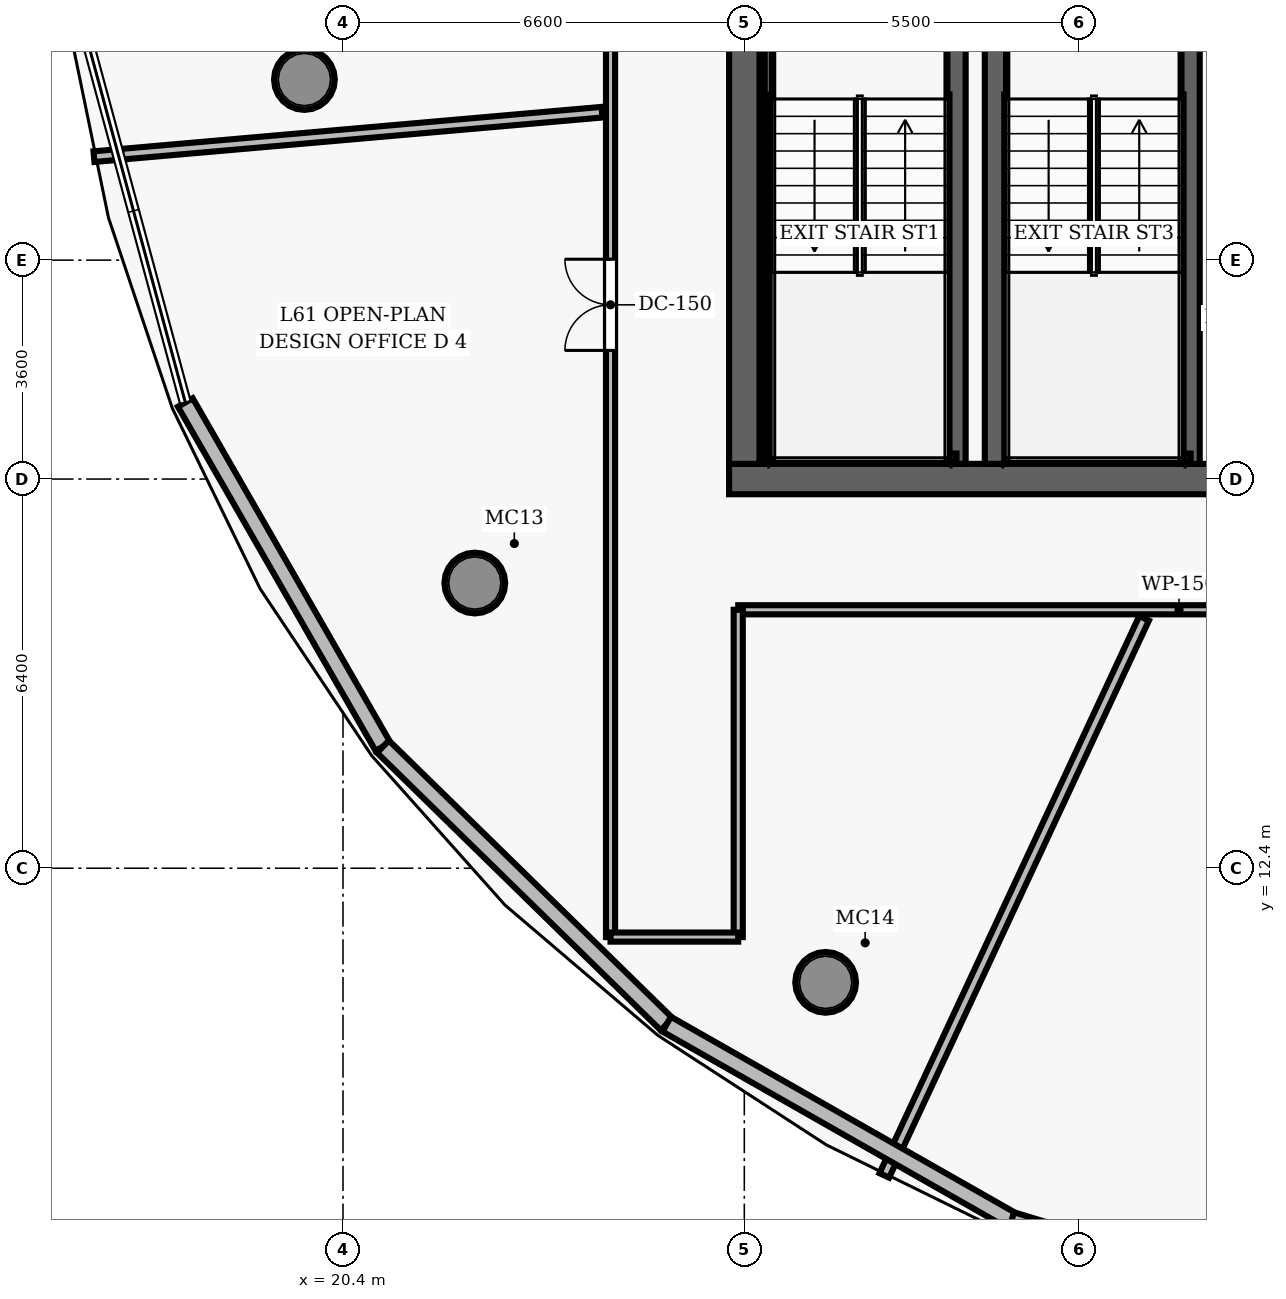
"""IFC4 building model, lengths in metres.
Left out: names, types, materials, properties, quantities, classifications, styles, units other than length and angle.
Written with IfcOpenShell. Run it as: python <this file> out.ifc"""

import sys

from ifc_helpers import new_model, si_unit, direction, frame, frame_2d, origin, origin_2d, place, context, subcontext, project, spatial, rectangle, hollow_circle, extrude, element, fill, save


model = new_model("IFC4")
c1 = context("Model", 3, precision=1e-05, world=origin(), true_north=direction((0.0, 1.0)))
c2 = subcontext(c1, "Body", "Model", "MODEL_VIEW")
j1 = project(units=[si_unit("LENGTHUNIT", "METRE"), si_unit("PLANEANGLEUNIT", "RADIAN")], contexts=[c1])
p1 = place(None, origin())
s1 = spatial("IfcSite", under=j1, at=p1, CompositionType="ELEMENT")
p2 = place(p1, origin())
s2 = spatial("IfcBuilding", under=s1, at=p2, CompositionType="ELEMENT")
p3 = place(p2, frame((0.0, 0.0, 242.05)))
s3 = spatial("IfcBuildingStorey", under=s2, at=p3, CompositionType="ELEMENT", Elevation=242.05)
p4 = place(p3, frame((26.75, 18.8, 0.0), z_axis=(0.0, 0.0, 1.0), x_axis=(1.0, 0.0, 0.0)))
e1 = element("IfcWall", 1, at=p4, inside=s3, PredefinedType="SHEAR", context=c2, shape_type="SweptSolid", body=[
    extrude(rectangle(XDim=22.5, YDim=0.5, at=frame_2d((11.25, 0.0))), origin(), (0.0, 0.0, 1.0), 3.85),
])
p5 = place(p4, frame((14.47, 0.0, 0.0)))
e2 = element("IfcOpeningElement", 2, at=p5, cuts=e1, PredefinedType="OPENING", context=c2, shape_type="SweptSolid", body=[
    extrude(rectangle(XDim=1.05, YDim=2.15, at=frame_2d((0.525, 1.075))), frame((0.0, 0.26, 0.0), z_axis=(0.0, -1.0, 0.0), x_axis=(1.0, 0.0, 0.0)), (0.0, 0.0, 1.0), 0.52),
])
p6 = place(p3, frame((27.0, 19.05, 0.0), z_axis=(0.0, 0.0, 1.0), x_axis=(0.0, 1.0, 0.0)))
e3 = element("IfcWall", 3, at=p6, inside=s3, PredefinedType="SHEAR", context=c2, shape_type="SweptSolid", body=[
    extrude(rectangle(XDim=13.9, YDim=0.5, at=frame_2d((6.95, 0.0))), origin(), (0.0, 0.0, 1.0), 3.85),
])
p7 = place(p6, frame((8.2, 0.0, 0.0)))
e4 = element("IfcOpeningElement", 4, at=p7, cuts=e3, PredefinedType="OPENING", context=c2, shape_type="SweptSolid", body=[
    extrude(rectangle(XDim=1.05, YDim=2.15, at=frame_2d((0.525, 1.075))), frame((0.0, 0.26, 0.0), z_axis=(0.0, -1.0, 0.0), x_axis=(1.0, 0.0, 0.0)), (0.0, 0.0, 1.0), 0.52),
])
p8 = place(p3, frame((31.13, 19.05, 0.0), z_axis=(0.0, 0.0, 1.0), x_axis=(0.0, 1.0, 0.0)))
e5 = element("IfcWall", 5, at=p8, inside=s3, PredefinedType="SHEAR", context=c2, shape_type="SweptSolid", body=[
    extrude(rectangle(XDim=13.9, YDim=0.35, at=frame_2d((6.95, 0.0))), origin(), (0.0, 0.0, 1.0), 3.85),
])
for number, where, z_axis, x_axis in (
    (6, (19.765, 25.371, 0.0), (0.0, 0.0, 1.0), (1.0, 0.0, 0.0)),
    (7, (22.567, 17.09, 0.0), (0.0, 0.0, 1.0), (1.0, 0.0, 0.0)),
    (8, (28.338, 10.523, 0.0), (0.0, 0.0, 1.0), (1.0, 0.0, 0.0)),
):
    element("IfcColumn", number, at=place(p3, frame(where, z_axis=z_axis, x_axis=x_axis)), inside=s3, PredefinedType="COLUMN", context=c2, shape_type="SweptSolid", body=[
        extrude(hollow_circle(Radius=0.5, WallThickness=0.045, at=origin_2d()), origin(), (0.0, 0.0, 1.0), 3.85),
    ])
p9 = place(p3, frame((30.49, 19.05, 0.0), z_axis=(0.0, 0.0, 1.0), x_axis=(0.0, 1.0, 0.0)))
e9 = element("IfcWall", 9, at=p9, inside=s3, PredefinedType="SHEAR", context=c2, shape_type="SweptSolid", body=[
    extrude(rectangle(XDim=7.5, YDim=0.3, at=frame_2d((3.75, 0.0))), origin(), (0.0, 0.0, 1.0), 3.85),
])
p10 = place(p3, frame((27.395, 19.1, 0.0), z_axis=(0.0, 0.0, 1.0), x_axis=(0.0, 1.0, 0.0)))
e10 = element("IfcWall", 10, at=p10, inside=s3, PredefinedType="SHEAR", context=c2, shape_type="SweptSolid", body=[
    extrude(rectangle(XDim=7.45, YDim=0.12, at=frame_2d((3.725, 0.0))), origin(), (0.0, 0.0, 1.0), 3.85),
])
p11 = place(p3, frame((27.395, 19.16, 0.0), z_axis=(0.0, 0.0, 1.0), x_axis=(1.0, 0.0, 0.0)))
e11 = element("IfcWall", 11, at=p11, inside=s3, PredefinedType="SHEAR", context=c2, shape_type="SweptSolid", body=[
    extrude(rectangle(XDim=3.095, YDim=0.12, at=frame_2d((1.547, 0.0))), origin(), (0.0, 0.0, 1.0), 3.85),
])
p12 = place(p3, frame((34.34, 19.05, 0.0), z_axis=(0.0, 0.0, 1.0), x_axis=(0.0, 1.0, 0.0)))
e12 = element("IfcWall", 12, at=p12, inside=s3, PredefinedType="SHEAR", context=c2, shape_type="SweptSolid", body=[
    extrude(rectangle(XDim=7.5, YDim=0.3, at=frame_2d((3.75, 0.0))), origin(), (0.0, 0.0, 1.0), 3.85),
])
p13 = place(p3, frame((31.3, 19.16, 0.0), z_axis=(0.0, 0.0, 1.0), x_axis=(1.0, 0.0, 0.0)))
e13 = element("IfcWall", 13, at=p13, inside=s3, PredefinedType="SHEAR", context=c2, shape_type="SweptSolid", body=[
    extrude(rectangle(XDim=3.04, YDim=0.12, at=frame_2d((1.52, 0.0))), origin(), (0.0, 0.0, 1.0), 3.85),
])
p14 = place(p3, frame((26.9, 16.65, 0.0), z_axis=(0.0, 0.0, 1.0), x_axis=(1.0, 0.0, 0.0)))
e14 = element("IfcWall", 14, at=p14, inside=s3, PredefinedType="PARTITIONING", context=c2, shape_type="SweptSolid", body=[
    extrude(rectangle(XDim=22.2, YDim=0.15, at=frame_2d((11.1, 0.0))), origin(), (0.0, 0.0, 1.0), 3.04),
])
p15 = place(p14, frame((14.65, 0.0, 0.0)))
e15 = element("IfcOpeningElement", 15, at=p15, cuts=e14, PredefinedType="OPENING", context=c2, shape_type="SweptSolid", body=[
    extrude(rectangle(XDim=0.95, YDim=2.15, at=frame_2d((0.475, 1.075))), frame((0.0, 0.085, 0.0), z_axis=(0.0, -1.0, 0.0), x_axis=(1.0, 0.0, 0.0)), (0.0, 0.0, 1.0), 0.17),
])
p16 = place(p3, frame((24.8, 11.268, 0.0), z_axis=(0.0, 0.0, 1.0), x_axis=(0.0, 1.0, 0.0)))
e16 = element("IfcWall", 16, at=p16, inside=s3, PredefinedType="PARTITIONING", context=c2, shape_type="SweptSolid", body=[
    extrude(rectangle(XDim=30.132, YDim=0.15, at=frame_2d((15.066, 0.0))), origin(), (0.0, 0.0, 1.0), 3.04),
])
p17 = place(p16, frame((16.736, 0.0, 0.0)))
e17 = element("IfcOpeningElement", 17, at=p17, cuts=e16, PredefinedType="OPENING", context=c2, shape_type="SweptSolid", body=[
    extrude(rectangle(XDim=1.5, YDim=2.2, at=frame_2d((0.75, 1.1))), frame((0.0, 0.085, 0.0), z_axis=(0.0, -1.0, 0.0), x_axis=(1.0, 0.0, 0.0)), (0.0, 0.0, 1.0), 0.17),
])
p18 = place(p16, frame((9.648, 0.0, 0.0)))
e18 = element("IfcOpeningElement", 18, at=p18, cuts=e16, PredefinedType="OPENING", context=c2, shape_type="SweptSolid", body=[
    extrude(rectangle(XDim=1.5, YDim=2.2, at=frame_2d((0.75, 1.1))), frame((0.0, 0.085, 0.0), z_axis=(0.0, -1.0, 0.0), x_axis=(1.0, 0.0, 0.0)), (0.0, 0.0, 1.0), 0.17),
])
p19 = place(p3, frame((26.9, 11.268, 0.0), z_axis=(0.0, 0.0, 1.0), x_axis=(0.0, 1.0, 0.0)))
e19 = element("IfcWall", 19, at=p19, inside=s3, PredefinedType="PARTITIONING", context=c2, shape_type="SweptSolid", body=[
    extrude(rectangle(XDim=5.382, YDim=0.15, at=frame_2d((2.691, 0.0))), origin(), (0.0, 0.0, 1.0), 3.04),
])
p20 = place(p3, frame((24.8, 11.268, 0.0), z_axis=(0.0, 0.0, 1.0), x_axis=(1.0, 0.0, 0.0)))
e20 = element("IfcWall", 20, at=p20, inside=s3, PredefinedType="PARTITIONING", context=c2, shape_type="SweptSolid", body=[
    extrude(rectangle(XDim=2.1, YDim=0.15, at=frame_2d((1.05, 0.0))), origin(), (0.0, 0.0, 1.0), 3.04),
])
p21 = place(p3, frame((24.66, 24.833, 0.0), z_axis=(0.0, 0.0, 1.0), x_axis=(-0.996192927603, -0.087175977156, 0.0)))
e21 = element("IfcWall", 21, at=p21, inside=s3, PredefinedType="PARTITIONING", context=c2, shape_type="SweptSolid", body=[
    extrude(rectangle(XDim=8.388, YDim=0.175, at=frame_2d((4.194, 0.0))), origin(), (0.0, 0.0, 1.0), 3.04),
])
p22 = place(p3, frame((33.575, 16.51, 0.0), z_axis=(0.0, 0.0, 1.0), x_axis=(-0.422617069522, -0.906308342976, 0.0)))
e22 = element("IfcWall", 22, at=p22, inside=s3, PredefinedType="PARTITIONING", context=c2, shape_type="SweptSolid", body=[
    extrude(rectangle(XDim=10.11, YDim=0.175, at=frame_2d((5.055, 0.0))), origin(), (0.0, 0.0, 1.0), 3.04),
])
p23 = place(p3, frame((21.058, 14.399, 0.0), z_axis=(0.0, 0.0, 1.0), x_axis=(-0.498043079681, 0.867152288114, 0.0)))
e23 = element("IfcWall", 23, at=p23, inside=s3, PredefinedType="SOLIDWALL", context=c2, shape_type="SweptSolid", body=[
    extrude(rectangle(XDim=6.527, YDim=0.28, at=frame_2d((3.264, 0.0))), origin(), (0.0, 0.0, 1.0), 3.625),
])
p24 = place(p3, frame((25.723, 9.835, 0.0), z_axis=(0.0, 0.0, 1.0), x_axis=(-0.714844187418, 0.699283767661, 0.0)))
e24 = element("IfcWall", 24, at=p24, inside=s3, PredefinedType="SOLIDWALL", context=c2, shape_type="SweptSolid", body=[
    extrude(rectangle(XDim=6.527, YDim=0.28, at=frame_2d((3.263, 0.0))), origin(), (0.0, 0.0, 1.0), 3.625),
])
p25 = place(p3, frame((31.396, 6.607, 0.0), z_axis=(0.0, 0.0, 1.0), x_axis=(-0.869128067122, 0.494587103492, 0.0)))
e25 = element("IfcWall", 25, at=p25, inside=s3, PredefinedType="SOLIDWALL", context=c2, shape_type="SweptSolid", body=[
    extrude(rectangle(XDim=6.526, YDim=0.28, at=frame_2d((3.263, 0.0))), origin(), (0.0, 0.0, 1.0), 3.625),
])
p26 = place(p3, frame((37.468, 4.766, 0.0), z_axis=(0.0, 0.0, 1.0), x_axis=(-0.956967430601, 0.290195342431, 0.0)))
e26 = element("IfcWall", 26, at=p26, inside=s3, PredefinedType="SOLIDWALL", context=c2, shape_type="SweptSolid", body=[
    extrude(rectangle(XDim=6.345, YDim=0.28, at=frame_2d((3.172, 0.0))), origin(), (0.0, 0.0, 1.0), 3.625),
])
p27 = place(p18, origin())
e27 = element("IfcDoor", 27, at=p27, inside=s3, OperationType="DOUBLE_DOOR_SINGLE_SWING", PredefinedType="DOOR", context=c2, shape_type="SweptSolid", body=[
    extrude(rectangle(XDim=1.5, YDim=2.2, at=frame_2d((0.75, 1.1))), frame((0.0, 0.025, 0.0), z_axis=(0.0, -1.0, 0.0), x_axis=(1.0, 0.0, 0.0)), (0.0, 0.0, 1.0), 0.05),
])
fill(e18, e27)
save(model, sys.argv[1])
